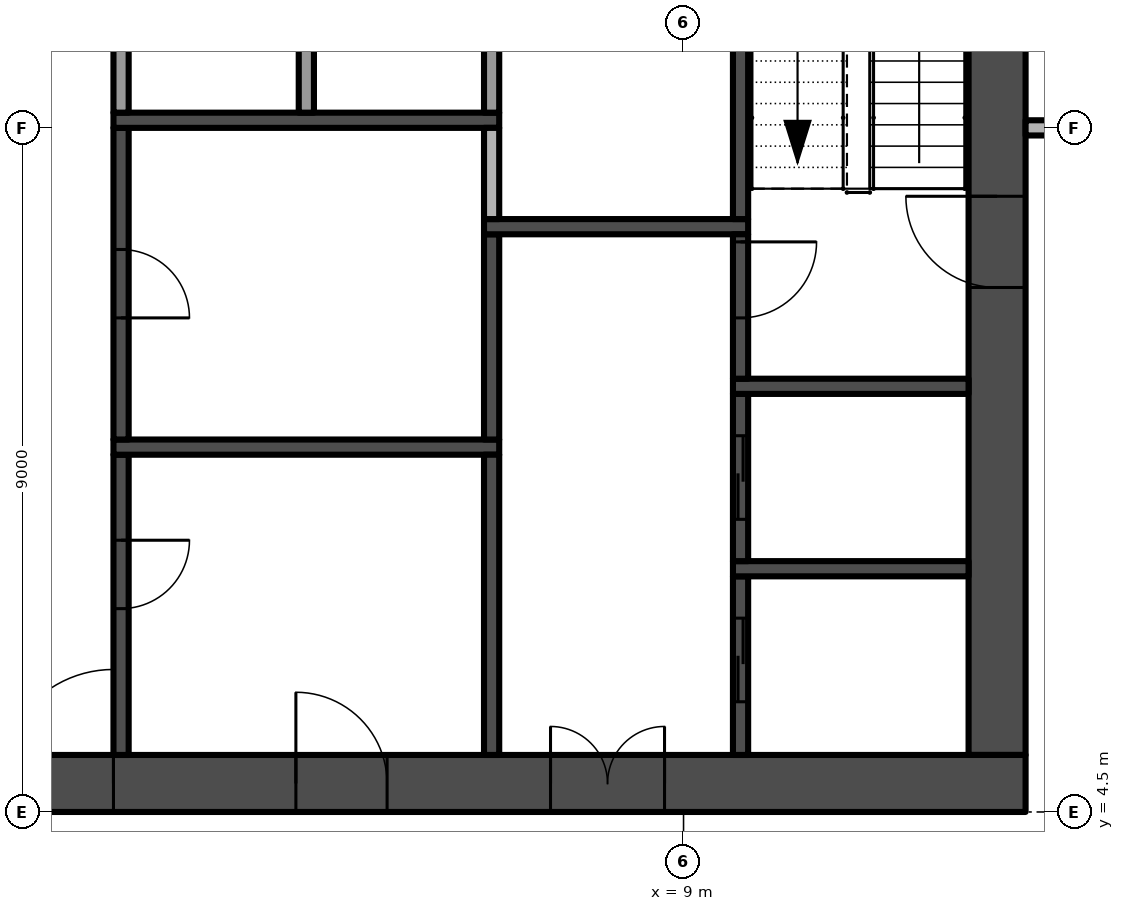
"""IFC4 building model, lengths in metres.
Left out: names, types, materials, properties, quantities, classifications, styles, units other than length and angle.
Written with IfcOpenShell. Run it as: python <this file> out.ifc"""

import sys

from ifc_helpers import new_model, si_unit, direction, frame, frame_2d, origin, place, context, subcontext, project, spatial, rectangle, extrude, element, fill, save


model = new_model("IFC4")
c1 = context("Model", 3, precision=1e-05, world=origin(), true_north=direction((0.0, 1.0)))
c2 = subcontext(c1, "Body", "Model", "MODEL_VIEW")
j1 = project(units=[si_unit("LENGTHUNIT", "METRE"), si_unit("PLANEANGLEUNIT", "RADIAN")], contexts=[c1])
p1 = place(None, origin())
s1 = spatial("IfcSite", under=j1, at=p1, CompositionType="ELEMENT")
p2 = place(p1, origin())
s2 = spatial("IfcBuilding", under=s1, at=p2, CompositionType="ELEMENT")
p3 = place(p2, frame((0.0, 0.0, 132.6)))
s3 = spatial("IfcBuildingStorey", under=s2, at=p3, CompositionType="ELEMENT", Elevation=132.6)
p4 = place(p3, frame((-13.5, 4.875, -0.3), z_axis=(0.0, 0.0, 1.0), x_axis=(1.0, 0.0, 0.0)))
e1 = element("IfcWall", 1, at=p4, inside=s3, PredefinedType="SHEAR", context=c2, shape_type="SweptSolid", body=[
    extrude(rectangle(XDim=27.0, YDim=0.75, at=frame_2d((13.5, 0.0))), origin(), (0.0, 0.0, 1.0), 3.8),
])
p5 = place(p4, frame((12.0, 0.0, 0.3)))
e2 = element("IfcOpeningElement", 2, at=p5, cuts=e1, PredefinedType="OPENING", context=c2, shape_type="SweptSolid", body=[
    extrude(rectangle(XDim=3.0, YDim=2.4, at=frame_2d((1.5, 1.2))), frame((0.0, 0.385, 0.0), z_axis=(0.0, -1.0, 0.0), x_axis=(1.0, 0.0, 0.0)), (0.0, 0.0, 1.0), 0.77),
])
p6 = place(p4, frame((4.9, 0.0, 0.3)))
e3 = element("IfcOpeningElement", 3, at=p6, cuts=e1, PredefinedType="OPENING", context=c2, shape_type="SweptSolid", body=[
    extrude(rectangle(XDim=1.2, YDim=2.2, at=frame_2d((0.6, 1.1))), frame((0.0, 0.385, 0.0), z_axis=(0.0, -1.0, 0.0), x_axis=(1.0, 0.0, 0.0)), (0.0, 0.0, 1.0), 0.77),
])
p7 = place(p4, frame((20.75, 0.0, 0.3)))
e4 = element("IfcOpeningElement", 4, at=p7, cuts=e1, PredefinedType="OPENING", context=c2, shape_type="SweptSolid", body=[
    extrude(rectangle(XDim=1.5, YDim=2.2, at=frame_2d((0.75, 1.1))), frame((0.0, 0.385, 0.0), z_axis=(0.0, -1.0, 0.0), x_axis=(1.0, 0.0, 0.0)), (0.0, 0.0, 1.0), 0.77),
])
p8 = place(p4, frame((17.4, 0.0, 0.3)))
e5 = element("IfcOpeningElement", 5, at=p8, cuts=e1, PredefinedType="OPENING", context=c2, shape_type="SweptSolid", body=[
    extrude(rectangle(XDim=1.2, YDim=2.2, at=frame_2d((0.6, 1.1))), frame((0.0, 0.385, 0.0), z_axis=(0.0, -1.0, 0.0), x_axis=(1.0, 0.0, 0.0)), (0.0, 0.0, 1.0), 0.77),
])
p9 = place(p3, frame((13.125, 5.25, -0.3), z_axis=(0.0, 0.0, 1.0), x_axis=(0.0, 1.0, 0.0)))
e6 = element("IfcWall", 6, at=p9, inside=s3, PredefinedType="SHEAR", context=c2, shape_type="SweptSolid", body=[
    extrude(rectangle(XDim=16.5, YDim=0.75, at=frame_2d((8.25, 0.0))), origin(), (0.0, 0.0, 1.0), 3.8),
])
p10 = place(p9, frame((6.15, 0.0, 0.3)))
e7 = element("IfcOpeningElement", 7, at=p10, cuts=e6, PredefinedType="OPENING", context=c2, shape_type="SweptSolid", body=[
    extrude(rectangle(XDim=1.2, YDim=2.2, at=frame_2d((0.6, 1.1))), frame((0.0, 0.385, 0.0), z_axis=(0.0, -1.0, 0.0), x_axis=(1.0, 0.0, 0.0)), (0.0, 0.0, 1.0), 0.77),
])
p11 = place(p3, frame((1.6, 9.2, 0.0), z_axis=(0.0, 0.0, 1.0), x_axis=(0.0, -1.0, 0.0)))
e8 = element("IfcWall", 8, at=p11, inside=s3, PredefinedType="SHEAR", context=c2, shape_type="SweptSolid", body=[
    extrude(rectangle(XDim=3.95, YDim=0.2, at=frame_2d((1.975, 0.0))), origin(), (0.0, 0.0, 1.0), 3.5),
])
p12 = place(p11, frame((1.125, 0.0, 0.0)))
e9 = element("IfcOpeningElement", 9, at=p12, cuts=e8, PredefinedType="OPENING", context=c2, shape_type="SweptSolid", body=[
    extrude(rectangle(XDim=0.9, YDim=2.1, at=frame_2d((0.45, 1.05))), frame((0.0, 0.11, 0.0), z_axis=(0.0, -1.0, 0.0), x_axis=(1.0, 0.0, 0.0)), (0.0, 0.0, 1.0), 0.22),
])
p13 = place(p3, frame((1.5, 9.3, 0.0), z_axis=(0.0, 0.0, 1.0), x_axis=(1.0, 0.0, 0.0)))
e10 = element("IfcWall", 10, at=p13, inside=s3, PredefinedType="SHEAR", context=c2, shape_type="SweptSolid", body=[
    extrude(rectangle(XDim=5.075, YDim=0.2, at=frame_2d((2.538, 0.0))), origin(), (0.0, 0.0, 1.0), 3.5),
])
p14 = place(p3, frame((1.6, 13.5, 0.0), z_axis=(0.0, 0.0, 1.0), x_axis=(0.0, -1.0, 0.0)))
e11 = element("IfcWall", 11, at=p14, inside=s3, PredefinedType="SHEAR", context=c2, shape_type="SweptSolid", body=[
    extrude(rectangle(XDim=4.1, YDim=0.2, at=frame_2d((2.05, 0.0))), origin(), (0.0, 0.0, 1.0), 3.5),
])
p15 = place(p14, frame((1.6, 0.0, 0.0)))
e12 = element("IfcOpeningElement", 12, at=p15, cuts=e11, PredefinedType="OPENING", context=c2, shape_type="SweptSolid", body=[
    extrude(rectangle(XDim=0.9, YDim=2.1, at=frame_2d((0.45, 1.05))), frame((0.0, 0.11, 0.0), z_axis=(0.0, -1.0, 0.0), x_axis=(1.0, 0.0, 0.0)), (0.0, 0.0, 1.0), 0.22),
])
p16 = place(p3, frame((1.5, 13.6, 0.0), z_axis=(0.0, 0.0, 1.0), x_axis=(1.0, 0.0, 0.0)))
e13 = element("IfcWall", 13, at=p16, inside=s3, PredefinedType="SHEAR", context=c2, shape_type="SweptSolid", body=[
    extrude(rectangle(XDim=5.075, YDim=0.2, at=frame_2d((2.538, 0.0))), origin(), (0.0, 0.0, 1.0), 3.5),
])
for number, where, z_axis, x_axis in (
    (14, (1.6, 13.7, 0.0), (0.0, 0.0, 1.0), (0.0, 1.0, 0.0)),
    (15, (4.037, 13.7, 0.0), (0.0, 0.0, 1.0), (0.0, 1.0, 0.0)),
):
    element("IfcWall", number, at=place(p3, frame(where, z_axis=z_axis, x_axis=x_axis)), inside=s3, PredefinedType="PARTITIONING", context=c2, shape_type="SweptSolid", body=[
        extrude(rectangle(XDim=2.2, YDim=0.2, at=frame_2d((1.1, 0.0))), origin(), (0.0, 0.0, 1.0), 3.5),
    ])
p17 = place(p3, frame((6.475, 5.25, 0.0), z_axis=(0.0, 0.0, 1.0), x_axis=(0.0, 1.0, 0.0)))
e16 = element("IfcWall", 16, at=p17, inside=s3, PredefinedType="SHEAR", context=c2, shape_type="SweptSolid", body=[
    extrude(rectangle(XDim=3.95, YDim=0.2, at=frame_2d((1.975, 0.0))), origin(), (0.0, 0.0, 1.0), 3.5),
])
p18 = place(p3, frame((6.475, 9.4, 0.0), z_axis=(0.0, 0.0, 1.0), x_axis=(0.0, 1.0, 0.0)))
e17 = element("IfcWall", 17, at=p18, inside=s3, PredefinedType="SHEAR", context=c2, shape_type="SweptSolid", body=[
    extrude(rectangle(XDim=2.7, YDim=0.2, at=frame_2d((1.35, 0.0))), origin(), (0.0, 0.0, 1.0), 3.5),
])
p19 = place(p3, frame((6.375, 12.2, 0.0), z_axis=(0.0, 0.0, 1.0), x_axis=(1.0, 0.0, 0.0)))
e18 = element("IfcWall", 18, at=p19, inside=s3, PredefinedType="SHEAR", context=c2, shape_type="SweptSolid", body=[
    extrude(rectangle(XDim=3.475, YDim=0.2, at=frame_2d((1.738, 0.0))), origin(), (0.0, 0.0, 1.0), 3.5),
])
p20 = place(p3, frame((6.475, 12.3, 0.0), z_axis=(0.0, 0.0, 1.0), x_axis=(0.0, 1.0, 0.0)))
e19 = element("IfcWall", 19, at=p20, inside=s3, PredefinedType="PARTITIONING", context=c2, shape_type="SweptSolid", body=[
    extrude(rectangle(XDim=1.2, YDim=0.2, at=frame_2d((0.6, 0.0))), origin(), (0.0, 0.0, 1.0), 3.5),
])
p21 = place(p3, frame((6.475, 13.7, 0.0), z_axis=(0.0, 0.0, 1.0), x_axis=(0.0, 1.0, 0.0)))
e20 = element("IfcWall", 20, at=p21, inside=s3, PredefinedType="PARTITIONING", context=c2, shape_type="SweptSolid", body=[
    extrude(rectangle(XDim=2.2, YDim=0.2, at=frame_2d((1.1, 0.0))), origin(), (0.0, 0.0, 1.0), 3.5),
])
p22 = place(p3, frame((9.75, 5.25, 0.0), z_axis=(0.0, 0.0, 1.0), x_axis=(0.0, 1.0, 0.0)))
e21 = element("IfcWall", 21, at=p22, inside=s3, PredefinedType="SHEAR", context=c2, shape_type="SweptSolid", body=[
    extrude(rectangle(XDim=2.35, YDim=0.2, at=frame_2d((1.175, 0.0))), origin(), (0.0, 0.0, 1.0), 3.5),
])
p23 = place(p22, frame((0.7, 0.0, 0.0)))
e22 = element("IfcOpeningElement", 22, at=p23, cuts=e21, PredefinedType="OPENING", context=c2, shape_type="SweptSolid", body=[
    extrude(rectangle(XDim=1.1, YDim=2.1, at=frame_2d((0.55, 1.05))), frame((0.0, 0.11, 0.0), z_axis=(0.0, -1.0, 0.0), x_axis=(1.0, 0.0, 0.0)), (0.0, 0.0, 1.0), 0.22),
])
p24 = place(p3, frame((9.65, 7.7, 0.0), z_axis=(0.0, 0.0, 1.0), x_axis=(1.0, 0.0, 0.0)))
e23 = element("IfcWall", 23, at=p24, inside=s3, PredefinedType="SHEAR", context=c2, shape_type="SweptSolid", body=[
    extrude(rectangle(XDim=3.1, YDim=0.2, at=frame_2d((1.55, 0.0))), origin(), (0.0, 0.0, 1.0), 3.5),
])
p25 = place(p3, frame((9.75, 7.8, 0.0), z_axis=(0.0, 0.0, 1.0), x_axis=(0.0, 1.0, 0.0)))
e24 = element("IfcWall", 24, at=p25, inside=s3, PredefinedType="SHEAR", context=c2, shape_type="SweptSolid", body=[
    extrude(rectangle(XDim=2.2, YDim=0.2, at=frame_2d((1.1, 0.0))), origin(), (0.0, 0.0, 1.0), 3.5),
])
p26 = place(p25, frame((0.55, 0.0, 0.0)))
e25 = element("IfcOpeningElement", 25, at=p26, cuts=e24, PredefinedType="OPENING", context=c2, shape_type="SweptSolid", body=[
    extrude(rectangle(XDim=1.1, YDim=2.1, at=frame_2d((0.55, 1.05))), frame((0.0, 0.11, 0.0), z_axis=(0.0, -1.0, 0.0), x_axis=(1.0, 0.0, 0.0)), (0.0, 0.0, 1.0), 0.22),
])
p27 = place(p3, frame((9.65, 10.1, 0.0), z_axis=(0.0, 0.0, 1.0), x_axis=(1.0, 0.0, 0.0)))
e26 = element("IfcWall", 26, at=p27, inside=s3, PredefinedType="SHEAR", context=c2, shape_type="SweptSolid", body=[
    extrude(rectangle(XDim=3.1, YDim=0.2, at=frame_2d((1.55, 0.0))), origin(), (0.0, 0.0, 1.0), 3.5),
])
p28 = place(p3, frame((9.75, 12.1, 0.0), z_axis=(0.0, 0.0, 1.0), x_axis=(0.0, -1.0, 0.0)))
e27 = element("IfcWall", 27, at=p28, inside=s3, PredefinedType="SHEAR", context=c2, shape_type="SweptSolid", body=[
    extrude(rectangle(XDim=1.9, YDim=0.2, at=frame_2d((0.95, 0.0))), origin(), (0.0, 0.0, 1.0), 3.5),
])
p29 = place(p28, frame((0.1, 0.0, 0.0)))
e28 = element("IfcOpeningElement", 28, at=p29, cuts=e27, PredefinedType="OPENING", context=c2, shape_type="SweptSolid", body=[
    extrude(rectangle(XDim=1.0, YDim=2.2, at=frame_2d((0.5, 1.1))), frame((0.0, 0.11, 0.0), z_axis=(0.0, -1.0, 0.0), x_axis=(1.0, 0.0, 0.0)), (0.0, 0.0, 1.0), 0.22),
])
p30 = place(p3, frame((9.75, 12.3, 0.0), z_axis=(0.0, 0.0, 1.0), x_axis=(0.0, 1.0, 0.0)))
e29 = element("IfcWall", 29, at=p30, inside=s3, PredefinedType="SHEAR", context=c2, shape_type="SweptSolid", body=[
    extrude(rectangle(XDim=3.6, YDim=0.2, at=frame_2d((1.8, 0.0))), origin(), (0.0, 0.0, 1.0), 3.5),
])
p31 = place(p3, frame((13.5, 13.5, 0.0), z_axis=(0.0, 0.0, 1.0), x_axis=(1.0, 0.0, 0.0)))
e30 = element("IfcWall", 30, at=p31, inside=s3, PredefinedType="PARTITIONING", context=c2, shape_type="SweptSolid", body=[
    extrude(rectangle(XDim=3.85, YDim=0.2, at=frame_2d((1.925, 0.0))), origin(), (0.0, 0.0, 1.0), 3.5),
])
p32 = place(p31, frame((1.6, 0.0, 0.0)))
e31 = element("IfcOpeningElement", 31, at=p32, cuts=e30, PredefinedType="OPENING", context=c2, shape_type="SweptSolid", body=[
    extrude(rectangle(XDim=0.9, YDim=2.1, at=frame_2d((0.45, 1.05))), frame((0.0, 0.11, 0.0), z_axis=(0.0, -1.0, 0.0), x_axis=(1.0, 0.0, 0.0)), (0.0, 0.0, 1.0), 0.22),
])
p33 = place(p5, frame((3.0, 0.0, 0.0), z_axis=(0.0, 0.0, 1.0), x_axis=(-1.0, 0.0, 0.0)))
e32 = element("IfcDoor", 32, at=p33, inside=s3, OperationType="DOUBLE_DOOR_SINGLE_SWING", PredefinedType="DOOR", context=c2, shape_type="SweptSolid", body=[
    extrude(rectangle(XDim=3.0, YDim=2.4, at=frame_2d((1.5, 1.2))), frame((0.0, 0.025, 0.0), z_axis=(0.0, -1.0, 0.0), x_axis=(1.0, 0.0, 0.0)), (0.0, 0.0, 1.0), 0.05),
])
fill(e2, e32)
p34 = place(p10, frame((1.2, 0.0, 0.0), z_axis=(0.0, 0.0, 1.0), x_axis=(-1.0, 0.0, 0.0)))
e33 = element("IfcDoor", 33, at=p34, inside=s3, OperationType="SINGLE_SWING_LEFT", PredefinedType="DOOR", context=c2, shape_type="SweptSolid", body=[
    extrude(rectangle(XDim=1.2, YDim=2.2, at=frame_2d((0.6, 1.1))), frame((0.0, 0.025, 0.0), z_axis=(0.0, -1.0, 0.0), x_axis=(1.0, 0.0, 0.0)), (0.0, 0.0, 1.0), 0.05),
])
fill(e7, e33)
p35 = place(p7, frame((1.5, 0.0, 0.0), z_axis=(0.0, 0.0, 1.0), x_axis=(-1.0, 0.0, 0.0)))
e34 = element("IfcDoor", 34, at=p35, inside=s3, OperationType="DOUBLE_DOOR_SINGLE_SWING", PredefinedType="DOOR", context=c2, shape_type="SweptSolid", body=[
    extrude(rectangle(XDim=1.5, YDim=2.2, at=frame_2d((0.75, 1.1))), frame((0.0, 0.025, 0.0), z_axis=(0.0, -1.0, 0.0), x_axis=(1.0, 0.0, 0.0)), (0.0, 0.0, 1.0), 0.05),
])
fill(e4, e34)
p36 = place(p8, frame((1.2, 0.0, 0.0), z_axis=(0.0, 0.0, 1.0), x_axis=(-1.0, 0.0, 0.0)))
e35 = element("IfcDoor", 35, at=p36, inside=s3, OperationType="SINGLE_SWING_RIGHT", PredefinedType="DOOR", context=c2, shape_type="SweptSolid", body=[
    extrude(rectangle(XDim=1.2, YDim=2.2, at=frame_2d((0.6, 1.1))), frame((0.0, 0.025, 0.0), z_axis=(0.0, -1.0, 0.0), x_axis=(1.0, 0.0, 0.0)), (0.0, 0.0, 1.0), 0.05),
])
fill(e5, e35)
p37 = place(p29, origin())
e36 = element("IfcDoor", 36, at=p37, inside=s3, OperationType="SINGLE_SWING_LEFT", PredefinedType="DOOR", context=c2, shape_type="SweptSolid", body=[
    extrude(rectangle(XDim=1.0, YDim=2.2, at=frame_2d((0.5, 1.1))), frame((0.0, 0.025, 0.0), z_axis=(0.0, -1.0, 0.0), x_axis=(1.0, 0.0, 0.0)), (0.0, 0.0, 1.0), 0.05),
])
fill(e28, e36)
p38 = place(p23, origin())
e37 = element("IfcDoor", 37, at=p38, inside=s3, OperationType="SLIDING_TO_RIGHT", PredefinedType="DOOR", context=c2, shape_type="SweptSolid", body=[
    extrude(rectangle(XDim=1.1, YDim=2.1, at=frame_2d((0.55, 1.05))), frame((0.0, 0.025, 0.0), z_axis=(0.0, -1.0, 0.0), x_axis=(1.0, 0.0, 0.0)), (0.0, 0.0, 1.0), 0.05),
])
fill(e22, e37)
p39 = place(p26, origin())
e38 = element("IfcDoor", 38, at=p39, inside=s3, OperationType="SLIDING_TO_RIGHT", PredefinedType="DOOR", context=c2, shape_type="SweptSolid", body=[
    extrude(rectangle(XDim=1.1, YDim=2.1, at=frame_2d((0.55, 1.05))), frame((0.0, 0.025, 0.0), z_axis=(0.0, -1.0, 0.0), x_axis=(1.0, 0.0, 0.0)), (0.0, 0.0, 1.0), 0.05),
])
fill(e25, e38)
p40 = place(p12, origin())
e39 = element("IfcDoor", 39, at=p40, inside=s3, OperationType="SINGLE_SWING_LEFT", PredefinedType="DOOR", context=c2, shape_type="SweptSolid", body=[
    extrude(rectangle(XDim=0.9, YDim=2.1, at=frame_2d((0.45, 1.05))), frame((0.0, 0.025, 0.0), z_axis=(0.0, -1.0, 0.0), x_axis=(1.0, 0.0, 0.0)), (0.0, 0.0, 1.0), 0.05),
])
fill(e9, e39)
p41 = place(p15, origin())
e40 = element("IfcDoor", 40, at=p41, inside=s3, OperationType="SINGLE_SWING_RIGHT", PredefinedType="DOOR", context=c2, shape_type="SweptSolid", body=[
    extrude(rectangle(XDim=0.9, YDim=2.1, at=frame_2d((0.45, 1.05))), frame((0.0, 0.025, 0.0), z_axis=(0.0, -1.0, 0.0), x_axis=(1.0, 0.0, 0.0)), (0.0, 0.0, 1.0), 0.05),
])
fill(e12, e40)
save(model, sys.argv[1])
